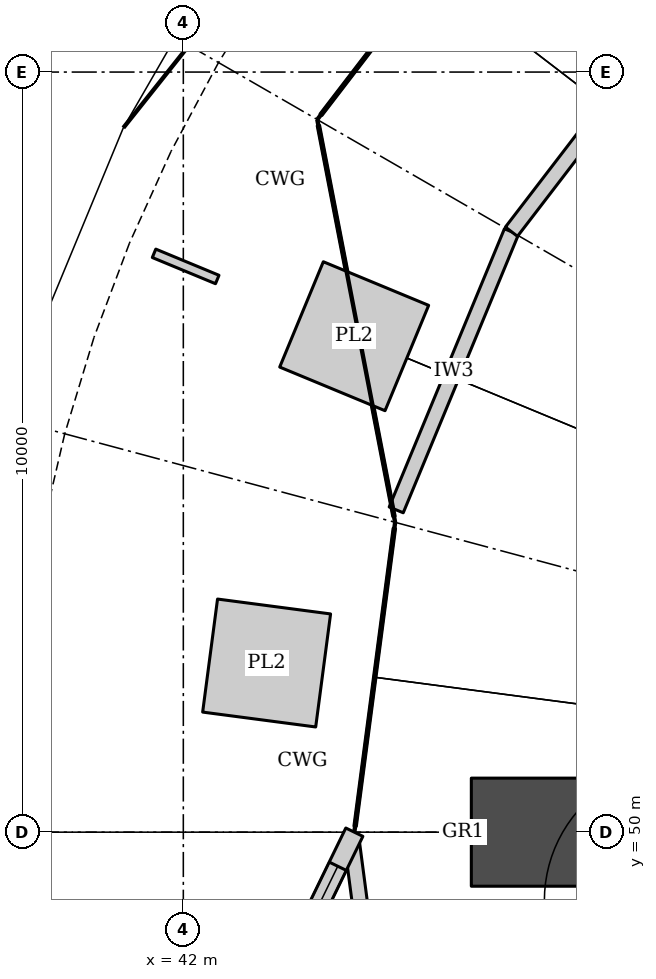
"""IFC4 building model, lengths in metres.
Left out: names, types, materials, properties, quantities, classifications, styles, units other than length and angle.
Written with IfcOpenShell. Run it as: python <this file> out.ifc"""

import sys

from ifc_helpers import new_model, si_unit, direction, frame, frame_2d, origin, origin_2d, place, context, subcontext, project, spatial, rectangle, hollow_circle, extrude, element, fill, save


model = new_model("IFC4")
c1 = context("Model", 3, precision=1e-05, world=origin(), true_north=direction((0.0, 1.0)))
c2 = subcontext(c1, "Body", "Model", "MODEL_VIEW")
j1 = project(units=[si_unit("LENGTHUNIT", "METRE"), si_unit("PLANEANGLEUNIT", "RADIAN")], contexts=[c1])
p1 = place(None, origin())
s1 = spatial("IfcSite", under=j1, at=p1, CompositionType="ELEMENT")
p2 = place(p1, origin())
s2 = spatial("IfcBuilding", under=s1, at=p2, CompositionType="ELEMENT")
p3 = place(p2, frame((0.0, 0.0, 269.6)))
s3 = spatial("IfcBuildingStorey", under=s2, at=p3, CompositionType="ELEMENT", Elevation=269.6)
p4 = place(p3, frame((46.5, 50.0, 0.0), z_axis=(0.0, 0.0, 1.0), x_axis=(1.0, 0.0, 0.0)))
e1 = element("IfcColumn", 1, at=p4, inside=s3, PredefinedType="COLUMN", context=c2, shape_type="SweptSolid", body=[
    extrude(hollow_circle(Radius=0.711, WallThickness=0.07, at=origin_2d()), origin(), (0.0, 0.0, 1.0), 4.2),
])
p5 = place(p3, frame((44.738, 45.911, 0.0), z_axis=(0.0, 0.0, 1.0), x_axis=(-0.130515758099, 0.991446234996, 0.0)))
e2 = element("IfcWall", 2, at=p5, inside=s3, PredefinedType="PARTITIONING", context=c2, shape_type="SweptSolid", body=[
    extrude(rectangle(XDim=4.125, YDim=0.2, at=frame_2d((2.062, 0.0))), origin(), (0.0, 0.0, 1.0), 3.02),
])
p6 = place(p3, frame((44.2, 50.0, 0.0), z_axis=(0.0, 0.0, 1.0), x_axis=(0.130515758099, 0.991446234996, 0.0)))
e3 = element("IfcWall", 3, at=p6, inside=s3, PredefinedType="PARTITIONING", context=c2, shape_type="SweptSolid", body=[
    extrude(rectangle(XDim=4.125, YDim=0.2, at=frame_2d((2.062, 0.0))), origin(), (0.0, 0.0, 1.0), 3.02),
])
p7 = place(p6, frame((1.562, 0.0, 0.0)))
e4 = element("IfcOpeningElement", 4, at=p7, cuts=e3, PredefinedType="OPENING", context=c2, shape_type="SweptSolid", body=[
    extrude(rectangle(XDim=1.0, YDim=2.1, at=frame_2d((0.5, 1.05))), frame((0.0, 0.11, 0.0), z_axis=(0.0, -1.0, 0.0), x_axis=(1.0, 0.0, 0.0)), (0.0, 0.0, 1.0), 0.22),
])
p8 = place(p3, frame((44.738, 54.089, 0.0), z_axis=(0.0, 0.0, 1.0), x_axis=(0.382731667114, 0.923859551549, 0.0)))
e5 = element("IfcWall", 5, at=p8, inside=s3, PredefinedType="PARTITIONING", context=c2, shape_type="SweptSolid", body=[
    extrude(rectangle(XDim=4.125, YDim=0.2, at=frame_2d((2.062, 0.0))), origin(), (0.0, 0.0, 1.0), 3.02),
])
p9 = place(p3, frame((46.317, 57.9, 0.0), z_axis=(0.0, 0.0, 1.0), x_axis=(0.608714823874, 0.793389099494, 0.0)))
e6 = element("IfcWall", 6, at=p9, inside=s3, PredefinedType="PARTITIONING", context=c2, shape_type="SweptSolid", body=[
    extrude(rectangle(XDim=4.125, YDim=0.2, at=frame_2d((2.062, 0.0))), origin(), (0.0, 0.0, 1.0), 3.02),
])
p10 = place(p3, frame((46.317, 57.9, 0.0), z_axis=(0.0, 0.0, 1.0), x_axis=(-0.866028632512, 0.499994407638, 0.0)))
e7 = element("IfcWall", 7, at=p10, inside=s3, PredefinedType="PARTITIONING", context=c2, shape_type="SweptSolid", body=[
    extrude(rectangle(XDim=3.16, YDim=0.125, at=frame_2d((1.58, 0.0))), origin(), (0.0, 0.0, 1.0), 3.02),
])
p11 = place(p3, frame((44.2, 50.0, 0.0), z_axis=(0.0, 0.0, 1.0), x_axis=(-1.0, 0.0, 0.0)))
e8 = element("IfcWall", 8, at=p11, inside=s3, PredefinedType="PARTITIONING", context=c2, shape_type="SweptSolid", body=[
    extrude(rectangle(XDim=3.06, YDim=0.2, at=frame_2d((1.53, 0.0))), origin(), (0.0, 0.0, 1.0), 3.02),
])
p12 = place(p3, frame((41.0, 50.0, 0.0), z_axis=(0.0, 0.0, 1.0), x_axis=(0.130538549191, -0.991443234469, 0.0)))
e9 = element("IfcWall", 9, at=p12, inside=s3, PredefinedType="SOLIDWALL", context=c2, shape_type="SweptSolid", body=[
    extrude(rectangle(XDim=4.96, YDim=0.25, at=frame_2d((2.48, 0.0))), origin(), (0.0, 0.0, 1.0), 4.04),
])
p13 = place(p12, frame((1.58, 0.0, 0.0)))
e10 = element("IfcOpeningElement", 10, at=p13, cuts=e9, PredefinedType="OPENING", context=c2, shape_type="SweptSolid", body=[
    extrude(rectangle(XDim=1.8, YDim=2.4, at=frame_2d((0.9, 1.2))), frame((0.0, 0.135, 0.0), z_axis=(0.0, -1.0, 0.0), x_axis=(1.0, 0.0, 0.0)), (0.0, 0.0, 1.0), 0.27),
])
p14 = place(p12, frame((0.28, 0.0, 0.0)))
e11 = element("IfcOpeningElement", 11, at=p14, cuts=e9, PredefinedType="OPENING", context=c2, shape_type="SweptSolid", body=[
    extrude(rectangle(XDim=0.9, YDim=2.4, at=frame_2d((0.45, 1.2))), frame((0.0, 0.135, 0.0), z_axis=(0.0, -1.0, 0.0), x_axis=(1.0, 0.0, 0.0)), (0.0, 0.0, 1.0), 0.27),
])
p15 = place(p12, frame((3.78, 0.0, 0.0)))
e12 = element("IfcOpeningElement", 12, at=p15, cuts=e9, PredefinedType="OPENING", context=c2, shape_type="SweptSolid", body=[
    extrude(rectangle(XDim=0.9, YDim=2.4, at=frame_2d((0.45, 1.2))), frame((0.0, 0.135, 0.0), z_axis=(0.0, -1.0, 0.0), x_axis=(1.0, 0.0, 0.0)), (0.0, 0.0, 1.0), 0.27),
])
p16 = place(p7, origin())
e13 = element("IfcDoor", 13, at=p16, inside=s3, OperationType="SINGLE_SWING_LEFT", PredefinedType="DOOR", context=c2, shape_type="SweptSolid", body=[
    extrude(rectangle(XDim=1.0, YDim=2.1, at=frame_2d((0.5, 1.05))), frame((0.0, 0.025, 0.0), z_axis=(0.0, -1.0, 0.0), x_axis=(1.0, 0.0, 0.0)), (0.0, 0.0, 1.0), 0.05),
])
fill(e4, e13)
p17 = place(p14, origin())
e14 = element("IfcWindow", 14, at=p17, inside=s3, PartitioningType="SINGLE_PANEL", PredefinedType="WINDOW", context=c2, shape_type="SweptSolid", body=[
    extrude(rectangle(XDim=0.9, YDim=2.4, at=frame_2d((0.45, 1.2))), frame((0.0, 0.03, 0.0), z_axis=(0.0, -1.0, 0.0), x_axis=(1.0, 0.0, 0.0)), (0.0, 0.0, 1.0), 0.06),
])
fill(e11, e14)
save(model, sys.argv[1])
